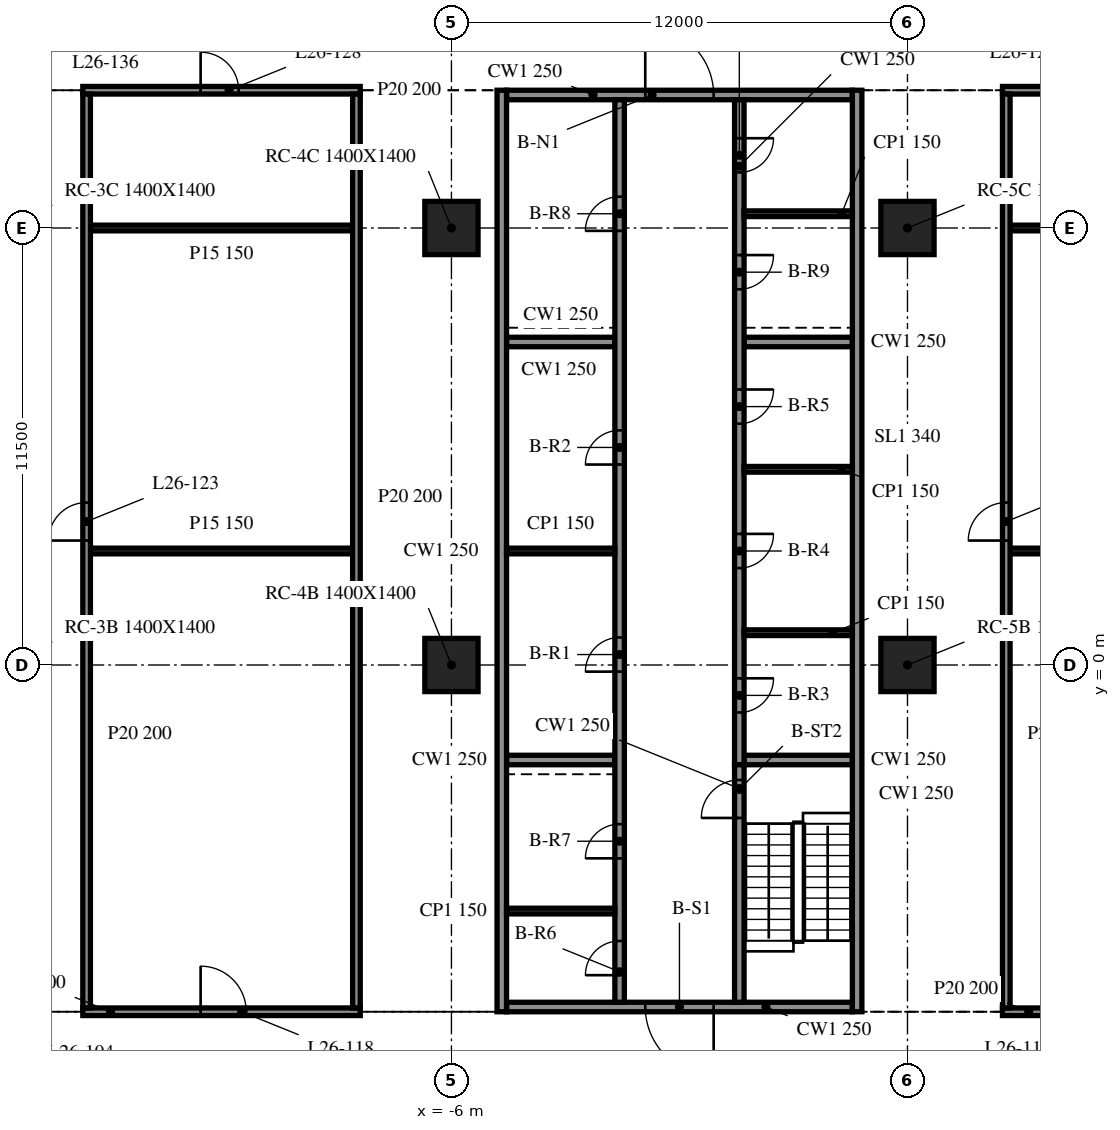
"""IFC4 building model, lengths in metres.
Left out: names, types, materials, properties, quantities, classifications, styles, units other than length and angle.
Written with IfcOpenShell. Run it as: python <this file> out.ifc"""

import sys

from ifc_helpers import new_model, si_unit, direction, frame, frame_2d, origin, origin_2d, place, context, subcontext, project, spatial, rectangle, extrude, element, fill, save


model = new_model("IFC4")
c1 = context("Model", 3, precision=1e-05, world=origin(), true_north=direction((0.0, 1.0)))
c2 = subcontext(c1, "Body", "Model", "MODEL_VIEW")
j1 = project(units=[si_unit("LENGTHUNIT", "METRE"), si_unit("PLANEANGLEUNIT", "RADIAN")], contexts=[c1])
p1 = place(None, origin())
s1 = spatial("IfcSite", under=j1, at=p1, CompositionType="ELEMENT")
p2 = place(p1, origin())
s2 = spatial("IfcBuilding", under=s1, at=p2, CompositionType="ELEMENT")
p3 = place(p2, frame((0.0, 0.0, 113.5)))
s3 = spatial("IfcBuildingStorey", under=s2, at=p3, CompositionType="ELEMENT", Elevation=113.5)
for number, where, z_axis, x_axis in (
    (1, (-6.0, 0.0, -0.34), (0.0, 0.0, 1.0), (1.0, 0.0, 0.0)),
    (2, (-6.0, 11.5, -0.34), (0.0, 0.0, 1.0), (1.0, 0.0, 0.0)),
    (3, (6.0, 0.0, -0.34), (0.0, 0.0, 1.0), (1.0, 0.0, 0.0)),
    (4, (6.0, 11.5, -0.34), (0.0, 0.0, 1.0), (1.0, 0.0, 0.0)),
):
    element("IfcColumn", number, at=place(p3, frame(where, z_axis=z_axis, x_axis=x_axis)), inside=s3, PredefinedType="COLUMN", context=c2, shape_type="SweptSolid", body=[
        extrude(rectangle(XDim=1.4, YDim=1.4, at=origin_2d()), origin(), (0.0, 0.0, 1.0), 3.89),
    ])
for number, where, z_axis, x_axis in (
    (5, (-4.675, 15.125, 0.0), (0.0, 0.0, 1.0), (0.0, -1.0, 0.0)),
    (6, (4.675, -9.125, 0.0), (0.0, 0.0, 1.0), (0.0, 1.0, 0.0)),
):
    element("IfcWall", number, at=place(p3, frame(where, z_axis=z_axis, x_axis=x_axis)), inside=s3, PredefinedType="SOLIDWALL", context=c2, shape_type="SweptSolid", body=[
        extrude(rectangle(XDim=24.25, YDim=0.25, at=frame_2d((12.125, 0.0))), origin(), (0.0, 0.0, 1.0), 3.55),
    ])
p4 = place(p3, frame((4.55, -9.0, 0.0), z_axis=(0.0, 0.0, 1.0), x_axis=(-1.0, 0.0, 0.0)))
e7 = element("IfcWall", 7, at=p4, inside=s3, PredefinedType="SOLIDWALL", context=c2, shape_type="SweptSolid", body=[
    extrude(rectangle(XDim=9.1, YDim=0.25, at=frame_2d((4.55, 0.0))), origin(), (0.0, 0.0, 1.0), 3.55),
])
p5 = place(p4, frame((3.65, 0.0, 0.0)))
e8 = element("IfcOpeningElement", 8, at=p5, cuts=e7, PredefinedType="OPENING", context=c2, shape_type="SweptSolid", body=[
    extrude(rectangle(XDim=1.8, YDim=2.1, at=frame_2d((0.9, 1.05))), frame((0.0, 0.135, 0.0), z_axis=(0.0, -1.0, 0.0), x_axis=(1.0, 0.0, 0.0)), (0.0, 0.0, 1.0), 0.27),
])
p6 = place(p3, frame((-4.55, 15.0, 0.0), z_axis=(0.0, 0.0, 1.0), x_axis=(1.0, 0.0, 0.0)))
e9 = element("IfcWall", 9, at=p6, inside=s3, PredefinedType="SOLIDWALL", context=c2, shape_type="SweptSolid", body=[
    extrude(rectangle(XDim=9.1, YDim=0.25, at=frame_2d((4.55, 0.0))), origin(), (0.0, 0.0, 1.0), 3.55),
])
p7 = place(p6, frame((3.65, 0.0, 0.0)))
e10 = element("IfcOpeningElement", 10, at=p7, cuts=e9, PredefinedType="OPENING", context=c2, shape_type="SweptSolid", body=[
    extrude(rectangle(XDim=1.8, YDim=2.1, at=frame_2d((0.9, 1.05))), frame((0.0, 0.135, 0.0), z_axis=(0.0, -1.0, 0.0), x_axis=(1.0, 0.0, 0.0)), (0.0, 0.0, 1.0), 0.27),
])
p8 = place(p3, frame((-1.575, -8.875, 0.0), z_axis=(0.0, 0.0, 1.0), x_axis=(0.0, 1.0, 0.0)))
e11 = element("IfcWall", 11, at=p8, inside=s3, PredefinedType="SOLIDWALL", context=c2, shape_type="SweptSolid", body=[
    extrude(rectangle(XDim=23.75, YDim=0.25, at=frame_2d((11.875, 0.0))), origin(), (0.0, 0.0, 1.0), 3.55),
])
p9 = place(p8, frame((8.7, 0.0, 0.0)))
e12 = element("IfcOpeningElement", 12, at=p9, cuts=e11, PredefinedType="OPENING", context=c2, shape_type="SweptSolid", body=[
    extrude(rectangle(XDim=0.9, YDim=2.1, at=frame_2d((0.45, 1.05))), frame((0.0, 0.135, 0.0), z_axis=(0.0, -1.0, 0.0), x_axis=(1.0, 0.0, 0.0)), (0.0, 0.0, 1.0), 0.27),
])
p10 = place(p8, frame((14.15, 0.0, 0.0)))
e13 = element("IfcOpeningElement", 13, at=p10, cuts=e11, PredefinedType="OPENING", context=c2, shape_type="SweptSolid", body=[
    extrude(rectangle(XDim=0.9, YDim=2.1, at=frame_2d((0.45, 1.05))), frame((0.0, 0.135, 0.0), z_axis=(0.0, -1.0, 0.0), x_axis=(1.0, 0.0, 0.0)), (0.0, 0.0, 1.0), 0.27),
])
p11 = place(p8, frame((0.712, 0.0, 0.0)))
e14 = element("IfcOpeningElement", 14, at=p11, cuts=e11, PredefinedType="OPENING", context=c2, shape_type="SweptSolid", body=[
    extrude(rectangle(XDim=0.9, YDim=2.1, at=frame_2d((0.45, 1.05))), frame((0.0, 0.135, 0.0), z_axis=(0.0, -1.0, 0.0), x_axis=(1.0, 0.0, 0.0)), (0.0, 0.0, 1.0), 0.27),
])
p12 = place(p8, frame((3.788, 0.0, 0.0)))
e15 = element("IfcOpeningElement", 15, at=p12, cuts=e11, PredefinedType="OPENING", context=c2, shape_type="SweptSolid", body=[
    extrude(rectangle(XDim=0.9, YDim=2.1, at=frame_2d((0.45, 1.05))), frame((0.0, 0.135, 0.0), z_axis=(0.0, -1.0, 0.0), x_axis=(1.0, 0.0, 0.0)), (0.0, 0.0, 1.0), 0.27),
])
p13 = place(p8, frame((20.3, 0.0, 0.0)))
e16 = element("IfcOpeningElement", 16, at=p13, cuts=e11, PredefinedType="OPENING", context=c2, shape_type="SweptSolid", body=[
    extrude(rectangle(XDim=0.9, YDim=2.1, at=frame_2d((0.45, 1.05))), frame((0.0, 0.135, 0.0), z_axis=(0.0, -1.0, 0.0), x_axis=(1.0, 0.0, 0.0)), (0.0, 0.0, 1.0), 0.27),
])
p14 = place(p3, frame((1.575, -8.875, 0.0), z_axis=(0.0, 0.0, 1.0), x_axis=(0.0, 1.0, 0.0)))
e17 = element("IfcWall", 17, at=p14, inside=s3, PredefinedType="SOLIDWALL", context=c2, shape_type="SweptSolid", body=[
    extrude(rectangle(XDim=6.25, YDim=0.25, at=frame_2d((3.125, 0.0))), origin(), (0.0, 0.0, 1.0), 3.55),
])
p15 = place(p14, frame((4.85, 0.0, 0.0)))
e18 = element("IfcOpeningElement", 18, at=p15, cuts=e17, PredefinedType="OPENING", context=c2, shape_type="SweptSolid", body=[
    extrude(rectangle(XDim=1.0, YDim=2.1, at=frame_2d((0.5, 1.05))), frame((0.0, 0.135, 0.0), z_axis=(0.0, -1.0, 0.0), x_axis=(1.0, 0.0, 0.0)), (0.0, 0.0, 1.0), 0.27),
])
p16 = place(p3, frame((1.575, 14.875, 0.0), z_axis=(0.0, 0.0, 1.0), x_axis=(0.0, -1.0, 0.0)))
e19 = element("IfcWall", 19, at=p16, inside=s3, PredefinedType="SOLIDWALL", context=c2, shape_type="SweptSolid", body=[
    extrude(rectangle(XDim=17.5, YDim=0.25, at=frame_2d((8.75, 0.0))), origin(), (0.0, 0.0, 1.0), 3.55),
])
p17 = place(p16, frame((15.225, 0.0, 0.0)))
e20 = element("IfcOpeningElement", 20, at=p17, cuts=e19, PredefinedType="OPENING", context=c2, shape_type="SweptSolid", body=[
    extrude(rectangle(XDim=0.9, YDim=2.1, at=frame_2d((0.45, 1.05))), frame((0.0, 0.135, 0.0), z_axis=(0.0, -1.0, 0.0), x_axis=(1.0, 0.0, 0.0)), (0.0, 0.0, 1.0), 0.27),
])
p18 = place(p16, frame((11.425, 0.0, 0.0)))
e21 = element("IfcOpeningElement", 21, at=p18, cuts=e19, PredefinedType="OPENING", context=c2, shape_type="SweptSolid", body=[
    extrude(rectangle(XDim=0.9, YDim=2.1, at=frame_2d((0.45, 1.05))), frame((0.0, 0.135, 0.0), z_axis=(0.0, -1.0, 0.0), x_axis=(1.0, 0.0, 0.0)), (0.0, 0.0, 1.0), 0.27),
])
p19 = place(p16, frame((7.625, 0.0, 0.0)))
e22 = element("IfcOpeningElement", 22, at=p19, cuts=e19, PredefinedType="OPENING", context=c2, shape_type="SweptSolid", body=[
    extrude(rectangle(XDim=0.9, YDim=2.1, at=frame_2d((0.45, 1.05))), frame((0.0, 0.135, 0.0), z_axis=(0.0, -1.0, 0.0), x_axis=(1.0, 0.0, 0.0)), (0.0, 0.0, 1.0), 0.27),
])
p20 = place(p16, frame((4.087, 0.0, 0.0)))
e23 = element("IfcOpeningElement", 23, at=p20, cuts=e19, PredefinedType="OPENING", context=c2, shape_type="SweptSolid", body=[
    extrude(rectangle(XDim=0.9, YDim=2.1, at=frame_2d((0.45, 1.05))), frame((0.0, 0.135, 0.0), z_axis=(0.0, -1.0, 0.0), x_axis=(1.0, 0.0, 0.0)), (0.0, 0.0, 1.0), 0.27),
])
p21 = place(p16, frame((1.012, 0.0, 0.0)))
e24 = element("IfcOpeningElement", 24, at=p21, cuts=e19, PredefinedType="OPENING", context=c2, shape_type="SweptSolid", body=[
    extrude(rectangle(XDim=0.9, YDim=2.1, at=frame_2d((0.45, 1.05))), frame((0.0, 0.135, 0.0), z_axis=(0.0, -1.0, 0.0), x_axis=(1.0, 0.0, 0.0)), (0.0, 0.0, 1.0), 0.27),
])
for number, where, z_axis, x_axis in (
    (25, (-4.55, -2.5, 0.0), (0.0, 0.0, 1.0), (1.0, 0.0, 0.0)),
    (26, (-4.55, 8.5, 0.0), (0.0, 0.0, 1.0), (1.0, 0.0, 0.0)),
    (27, (1.7, -2.5, 0.0), (0.0, 0.0, 1.0), (1.0, 0.0, 0.0)),
    (28, (1.7, 8.5, 0.0), (0.0, 0.0, 1.0), (1.0, 0.0, 0.0)),
):
    element("IfcWall", number, at=place(p3, frame(where, z_axis=z_axis, x_axis=x_axis)), inside=s3, PredefinedType="SOLIDWALL", context=c2, shape_type="SweptSolid", body=[
        extrude(rectangle(XDim=2.85, YDim=0.25, at=frame_2d((1.425, 0.0))), origin(), (0.0, 0.0, 1.0), 3.55),
    ])
for number, where, z_axis, x_axis in (
    (29, (-4.55, 3.0, 0.0), (0.0, 0.0, 1.0), (1.0, 0.0, 0.0)),
    (30, (1.7, 0.85, 0.0), (0.0, 0.0, 1.0), (1.0, 0.0, 0.0)),
    (31, (1.7, 5.15, 0.0), (0.0, 0.0, 1.0), (1.0, 0.0, 0.0)),
    (32, (-4.55, -6.475, 0.0), (0.0, 0.0, 1.0), (1.0, 0.0, 0.0)),
    (33, (1.7, 11.875, 0.0), (0.0, 0.0, 1.0), (1.0, 0.0, 0.0)),
):
    element("IfcWall", number, at=place(p3, frame(where, z_axis=z_axis, x_axis=x_axis)), inside=s3, PredefinedType="PARTITIONING", context=c2, shape_type="SweptSolid", body=[
        extrude(rectangle(XDim=2.85, YDim=0.15, at=frame_2d((1.425, 0.0))), origin(), (0.0, 0.0, 1.0), 3.55),
    ])
p22 = place(p3, frame((-15.7, -9.125, 0.0), z_axis=(0.0, 0.0, 1.0), x_axis=(1.0, 0.0, 0.0)))
e34 = element("IfcWall", 34, at=p22, inside=s3, PredefinedType="PARTITIONING", context=c2, shape_type="SweptSolid", body=[
    extrude(rectangle(XDim=7.3, YDim=0.2, at=frame_2d((3.65, 0.0))), origin(), (0.0, 0.0, 1.0), 3.55),
])
p23 = place(p22, frame((3.1, 0.0, 0.0)))
e35 = element("IfcOpeningElement", 35, at=p23, cuts=e34, PredefinedType="OPENING", context=c2, shape_type="SweptSolid", body=[
    extrude(rectangle(XDim=1.2, YDim=2.1, at=frame_2d((0.6, 1.05))), frame((0.0, 0.11, 0.0), z_axis=(0.0, -1.0, 0.0), x_axis=(1.0, 0.0, 0.0)), (0.0, 0.0, 1.0), 0.22),
])
p24 = place(p3, frame((8.5, -9.125, 0.0), z_axis=(0.0, 0.0, 1.0), x_axis=(1.0, 0.0, 0.0)))
e36 = element("IfcWall", 36, at=p24, inside=s3, PredefinedType="PARTITIONING", context=c2, shape_type="SweptSolid", body=[
    extrude(rectangle(XDim=6.9, YDim=0.2, at=frame_2d((3.45, 0.0))), origin(), (0.0, 0.0, 1.0), 3.55),
])
p25 = place(p24, frame((2.9, 0.0, 0.0)))
e37 = element("IfcOpeningElement", 37, at=p25, cuts=e36, PredefinedType="OPENING", context=c2, shape_type="SweptSolid", body=[
    extrude(rectangle(XDim=1.2, YDim=2.1, at=frame_2d((0.6, 1.05))), frame((0.0, 0.11, 0.0), z_axis=(0.0, -1.0, 0.0), x_axis=(1.0, 0.0, 0.0)), (0.0, 0.0, 1.0), 0.22),
])
p26 = place(p3, frame((-15.5, 3.0, 0.0), z_axis=(0.0, 0.0, 1.0), x_axis=(1.0, 0.0, 0.0)))
e38 = element("IfcWall", 38, at=p26, inside=s3, PredefinedType="PARTITIONING", context=c2, shape_type="SweptSolid", body=[
    extrude(rectangle(XDim=6.9, YDim=0.15, at=frame_2d((3.45, 0.0))), origin(), (0.0, 0.0, 1.0), 3.55),
])
p27 = place(p3, frame((8.7, 3.0, 0.0), z_axis=(0.0, 0.0, 1.0), x_axis=(1.0, 0.0, 0.0)))
e39 = element("IfcWall", 39, at=p27, inside=s3, PredefinedType="PARTITIONING", context=c2, shape_type="SweptSolid", body=[
    extrude(rectangle(XDim=6.5, YDim=0.15, at=frame_2d((3.25, 0.0))), origin(), (0.0, 0.0, 1.0), 3.55),
])
p28 = place(p3, frame((-15.5, 11.5, 0.0), z_axis=(0.0, 0.0, 1.0), x_axis=(1.0, 0.0, 0.0)))
e40 = element("IfcWall", 40, at=p28, inside=s3, PredefinedType="PARTITIONING", context=c2, shape_type="SweptSolid", body=[
    extrude(rectangle(XDim=6.9, YDim=0.15, at=frame_2d((3.45, 0.0))), origin(), (0.0, 0.0, 1.0), 3.55),
])
p29 = place(p3, frame((8.7, 11.5, 0.0), z_axis=(0.0, 0.0, 1.0), x_axis=(1.0, 0.0, 0.0)))
e41 = element("IfcWall", 41, at=p29, inside=s3, PredefinedType="PARTITIONING", context=c2, shape_type="SweptSolid", body=[
    extrude(rectangle(XDim=6.5, YDim=0.15, at=frame_2d((3.25, 0.0))), origin(), (0.0, 0.0, 1.0), 3.55),
])
p30 = place(p3, frame((-15.7, 15.125, 0.0), z_axis=(0.0, 0.0, 1.0), x_axis=(1.0, 0.0, 0.0)))
e42 = element("IfcWall", 42, at=p30, inside=s3, PredefinedType="PARTITIONING", context=c2, shape_type="SweptSolid", body=[
    extrude(rectangle(XDim=7.3, YDim=0.2, at=frame_2d((3.65, 0.0))), origin(), (0.0, 0.0, 1.0), 3.55),
])
p31 = place(p30, frame((3.1, 0.0, 0.0)))
e43 = element("IfcOpeningElement", 43, at=p31, cuts=e42, PredefinedType="OPENING", context=c2, shape_type="SweptSolid", body=[
    extrude(rectangle(XDim=1.0, YDim=2.1, at=frame_2d((0.5, 1.05))), frame((0.0, 0.11, 0.0), z_axis=(0.0, -1.0, 0.0), x_axis=(1.0, 0.0, 0.0)), (0.0, 0.0, 1.0), 0.22),
])
p32 = place(p3, frame((8.5, 15.125, 0.0), z_axis=(0.0, 0.0, 1.0), x_axis=(1.0, 0.0, 0.0)))
e44 = element("IfcWall", 44, at=p32, inside=s3, PredefinedType="PARTITIONING", context=c2, shape_type="SweptSolid", body=[
    extrude(rectangle(XDim=6.9, YDim=0.2, at=frame_2d((3.45, 0.0))), origin(), (0.0, 0.0, 1.0), 3.55),
])
p33 = place(p32, frame((2.9, 0.0, 0.0)))
e45 = element("IfcOpeningElement", 45, at=p33, cuts=e44, PredefinedType="OPENING", context=c2, shape_type="SweptSolid", body=[
    extrude(rectangle(XDim=1.0, YDim=2.1, at=frame_2d((0.5, 1.05))), frame((0.0, 0.11, 0.0), z_axis=(0.0, -1.0, 0.0), x_axis=(1.0, 0.0, 0.0)), (0.0, 0.0, 1.0), 0.22),
])
p34 = place(p3, frame((-15.6, -9.025, 0.0), z_axis=(0.0, 0.0, 1.0), x_axis=(0.0, 1.0, 0.0)))
e46 = element("IfcWall", 46, at=p34, inside=s3, PredefinedType="PARTITIONING", context=c2, shape_type="SweptSolid", body=[
    extrude(rectangle(XDim=24.05, YDim=0.2, at=frame_2d((12.025, 0.0))), origin(), (0.0, 0.0, 1.0), 3.55),
])
p35 = place(p34, frame((12.3, 0.0, 0.0)))
e47 = element("IfcOpeningElement", 47, at=p35, cuts=e46, PredefinedType="OPENING", context=c2, shape_type="SweptSolid", body=[
    extrude(rectangle(XDim=1.0, YDim=2.1, at=frame_2d((0.5, 1.05))), frame((0.0, 0.11, 0.0), z_axis=(0.0, -1.0, 0.0), x_axis=(1.0, 0.0, 0.0)), (0.0, 0.0, 1.0), 0.22),
])
p36 = place(p3, frame((-8.5, -9.025, 0.0), z_axis=(0.0, 0.0, 1.0), x_axis=(0.0, 1.0, 0.0)))
e48 = element("IfcWall", 48, at=p36, inside=s3, PredefinedType="PARTITIONING", context=c2, shape_type="SweptSolid", body=[
    extrude(rectangle(XDim=24.05, YDim=0.2, at=frame_2d((12.025, 0.0))), origin(), (0.0, 0.0, 1.0), 3.55),
])
p37 = place(p3, frame((8.6, -9.025, 0.0), z_axis=(0.0, 0.0, 1.0), x_axis=(0.0, 1.0, 0.0)))
e49 = element("IfcWall", 49, at=p37, inside=s3, PredefinedType="PARTITIONING", context=c2, shape_type="SweptSolid", body=[
    extrude(rectangle(XDim=24.05, YDim=0.2, at=frame_2d((12.025, 0.0))), origin(), (0.0, 0.0, 1.0), 3.55),
])
p38 = place(p37, frame((12.3, 0.0, 0.0)))
e50 = element("IfcOpeningElement", 50, at=p38, cuts=e49, PredefinedType="OPENING", context=c2, shape_type="SweptSolid", body=[
    extrude(rectangle(XDim=1.0, YDim=2.1, at=frame_2d((0.5, 1.05))), frame((0.0, 0.11, 0.0), z_axis=(0.0, -1.0, 0.0), x_axis=(1.0, 0.0, 0.0)), (0.0, 0.0, 1.0), 0.22),
])
p39 = place(p5, origin())
e51 = element("IfcDoor", 51, at=p39, inside=s3, OperationType="DOUBLE_DOOR_SINGLE_SWING", PredefinedType="DOOR", context=c2, shape_type="SweptSolid", body=[
    extrude(rectangle(XDim=1.8, YDim=2.1, at=frame_2d((0.9, 1.05))), frame((0.0, 0.025, 0.0), z_axis=(0.0, -1.0, 0.0), x_axis=(1.0, 0.0, 0.0)), (0.0, 0.0, 1.0), 0.05),
])
fill(e8, e51)
p40 = place(p7, origin())
e52 = element("IfcDoor", 52, at=p40, inside=s3, OperationType="DOUBLE_DOOR_SINGLE_SWING", PredefinedType="DOOR", context=c2, shape_type="SweptSolid", body=[
    extrude(rectangle(XDim=1.8, YDim=2.1, at=frame_2d((0.9, 1.05))), frame((0.0, 0.025, 0.0), z_axis=(0.0, -1.0, 0.0), x_axis=(1.0, 0.0, 0.0)), (0.0, 0.0, 1.0), 0.05),
])
fill(e10, e52)
p41 = place(p9, origin())
e53 = element("IfcDoor", 53, at=p41, inside=s3, OperationType="SINGLE_SWING_LEFT", PredefinedType="DOOR", context=c2, shape_type="SweptSolid", body=[
    extrude(rectangle(XDim=0.9, YDim=2.1, at=frame_2d((0.45, 1.05))), frame((0.0, 0.025, 0.0), z_axis=(0.0, -1.0, 0.0), x_axis=(1.0, 0.0, 0.0)), (0.0, 0.0, 1.0), 0.05),
])
fill(e12, e53)
p42 = place(p10, origin())
e54 = element("IfcDoor", 54, at=p42, inside=s3, OperationType="SINGLE_SWING_RIGHT", PredefinedType="DOOR", context=c2, shape_type="SweptSolid", body=[
    extrude(rectangle(XDim=0.9, YDim=2.1, at=frame_2d((0.45, 1.05))), frame((0.0, 0.025, 0.0), z_axis=(0.0, -1.0, 0.0), x_axis=(1.0, 0.0, 0.0)), (0.0, 0.0, 1.0), 0.05),
])
fill(e13, e54)
p43 = place(p17, origin())
e55 = element("IfcDoor", 55, at=p43, inside=s3, OperationType="SINGLE_SWING_LEFT", PredefinedType="DOOR", context=c2, shape_type="SweptSolid", body=[
    extrude(rectangle(XDim=0.9, YDim=2.1, at=frame_2d((0.45, 1.05))), frame((0.0, 0.025, 0.0), z_axis=(0.0, -1.0, 0.0), x_axis=(1.0, 0.0, 0.0)), (0.0, 0.0, 1.0), 0.05),
])
fill(e20, e55)
p44 = place(p18, origin())
e56 = element("IfcDoor", 56, at=p44, inside=s3, OperationType="SINGLE_SWING_RIGHT", PredefinedType="DOOR", context=c2, shape_type="SweptSolid", body=[
    extrude(rectangle(XDim=0.9, YDim=2.1, at=frame_2d((0.45, 1.05))), frame((0.0, 0.025, 0.0), z_axis=(0.0, -1.0, 0.0), x_axis=(1.0, 0.0, 0.0)), (0.0, 0.0, 1.0), 0.05),
])
fill(e21, e56)
p45 = place(p19, origin())
e57 = element("IfcDoor", 57, at=p45, inside=s3, OperationType="SINGLE_SWING_LEFT", PredefinedType="DOOR", context=c2, shape_type="SweptSolid", body=[
    extrude(rectangle(XDim=0.9, YDim=2.1, at=frame_2d((0.45, 1.05))), frame((0.0, 0.025, 0.0), z_axis=(0.0, -1.0, 0.0), x_axis=(1.0, 0.0, 0.0)), (0.0, 0.0, 1.0), 0.05),
])
fill(e22, e57)
p46 = place(p11, origin())
e58 = element("IfcDoor", 58, at=p46, inside=s3, OperationType="SINGLE_SWING_RIGHT", PredefinedType="DOOR", context=c2, shape_type="SweptSolid", body=[
    extrude(rectangle(XDim=0.9, YDim=2.1, at=frame_2d((0.45, 1.05))), frame((0.0, 0.025, 0.0), z_axis=(0.0, -1.0, 0.0), x_axis=(1.0, 0.0, 0.0)), (0.0, 0.0, 1.0), 0.05),
])
fill(e14, e58)
p47 = place(p12, origin())
e59 = element("IfcDoor", 59, at=p47, inside=s3, OperationType="SINGLE_SWING_LEFT", PredefinedType="DOOR", context=c2, shape_type="SweptSolid", body=[
    extrude(rectangle(XDim=0.9, YDim=2.1, at=frame_2d((0.45, 1.05))), frame((0.0, 0.025, 0.0), z_axis=(0.0, -1.0, 0.0), x_axis=(1.0, 0.0, 0.0)), (0.0, 0.0, 1.0), 0.05),
])
fill(e15, e59)
p48 = place(p13, origin())
e60 = element("IfcDoor", 60, at=p48, inside=s3, OperationType="SINGLE_SWING_RIGHT", PredefinedType="DOOR", context=c2, shape_type="SweptSolid", body=[
    extrude(rectangle(XDim=0.9, YDim=2.1, at=frame_2d((0.45, 1.05))), frame((0.0, 0.025, 0.0), z_axis=(0.0, -1.0, 0.0), x_axis=(1.0, 0.0, 0.0)), (0.0, 0.0, 1.0), 0.05),
])
fill(e16, e60)
p49 = place(p20, origin())
e61 = element("IfcDoor", 61, at=p49, inside=s3, OperationType="SINGLE_SWING_LEFT", PredefinedType="DOOR", context=c2, shape_type="SweptSolid", body=[
    extrude(rectangle(XDim=0.9, YDim=2.1, at=frame_2d((0.45, 1.05))), frame((0.0, 0.025, 0.0), z_axis=(0.0, -1.0, 0.0), x_axis=(1.0, 0.0, 0.0)), (0.0, 0.0, 1.0), 0.05),
])
fill(e23, e61)
p50 = place(p21, origin())
e62 = element("IfcDoor", 62, at=p50, inside=s3, OperationType="SINGLE_SWING_RIGHT", PredefinedType="DOOR", context=c2, shape_type="SweptSolid", body=[
    extrude(rectangle(XDim=0.9, YDim=2.1, at=frame_2d((0.45, 1.05))), frame((0.0, 0.025, 0.0), z_axis=(0.0, -1.0, 0.0), x_axis=(1.0, 0.0, 0.0)), (0.0, 0.0, 1.0), 0.05),
])
fill(e24, e62)
p51 = place(p15, origin())
e63 = element("IfcDoor", 63, at=p51, inside=s3, OperationType="SINGLE_SWING_LEFT", PredefinedType="DOOR", context=c2, shape_type="SweptSolid", body=[
    extrude(rectangle(XDim=1.0, YDim=2.1, at=frame_2d((0.5, 1.05))), frame((0.0, 0.025, 0.0), z_axis=(0.0, -1.0, 0.0), x_axis=(1.0, 0.0, 0.0)), (0.0, 0.0, 1.0), 0.05),
])
fill(e18, e63)
p52 = place(p23, origin())
e64 = element("IfcDoor", 64, at=p52, inside=s3, OperationType="SINGLE_SWING_RIGHT", PredefinedType="DOOR", context=c2, shape_type="SweptSolid", body=[
    extrude(rectangle(XDim=1.2, YDim=2.1, at=frame_2d((0.6, 1.05))), frame((0.0, 0.025, 0.0), z_axis=(0.0, -1.0, 0.0), x_axis=(1.0, 0.0, 0.0)), (0.0, 0.0, 1.0), 0.05),
])
fill(e35, e64)
p53 = place(p35, origin())
e65 = element("IfcDoor", 65, at=p53, inside=s3, OperationType="SINGLE_SWING_LEFT", PredefinedType="DOOR", context=c2, shape_type="SweptSolid", body=[
    extrude(rectangle(XDim=1.0, YDim=2.1, at=frame_2d((0.5, 1.05))), frame((0.0, 0.025, 0.0), z_axis=(0.0, -1.0, 0.0), x_axis=(1.0, 0.0, 0.0)), (0.0, 0.0, 1.0), 0.05),
])
fill(e47, e65)
p54 = place(p38, origin())
e66 = element("IfcDoor", 66, at=p54, inside=s3, OperationType="SINGLE_SWING_LEFT", PredefinedType="DOOR", context=c2, shape_type="SweptSolid", body=[
    extrude(rectangle(XDim=1.0, YDim=2.1, at=frame_2d((0.5, 1.05))), frame((0.0, 0.025, 0.0), z_axis=(0.0, -1.0, 0.0), x_axis=(1.0, 0.0, 0.0)), (0.0, 0.0, 1.0), 0.05),
])
fill(e50, e66)
p55 = place(p31, origin())
e67 = element("IfcDoor", 67, at=p55, inside=s3, OperationType="SINGLE_SWING_RIGHT", PredefinedType="DOOR", context=c2, shape_type="SweptSolid", body=[
    extrude(rectangle(XDim=1.0, YDim=2.1, at=frame_2d((0.5, 1.05))), frame((0.0, 0.025, 0.0), z_axis=(0.0, -1.0, 0.0), x_axis=(1.0, 0.0, 0.0)), (0.0, 0.0, 1.0), 0.05),
])
fill(e43, e67)
save(model, sys.argv[1])
